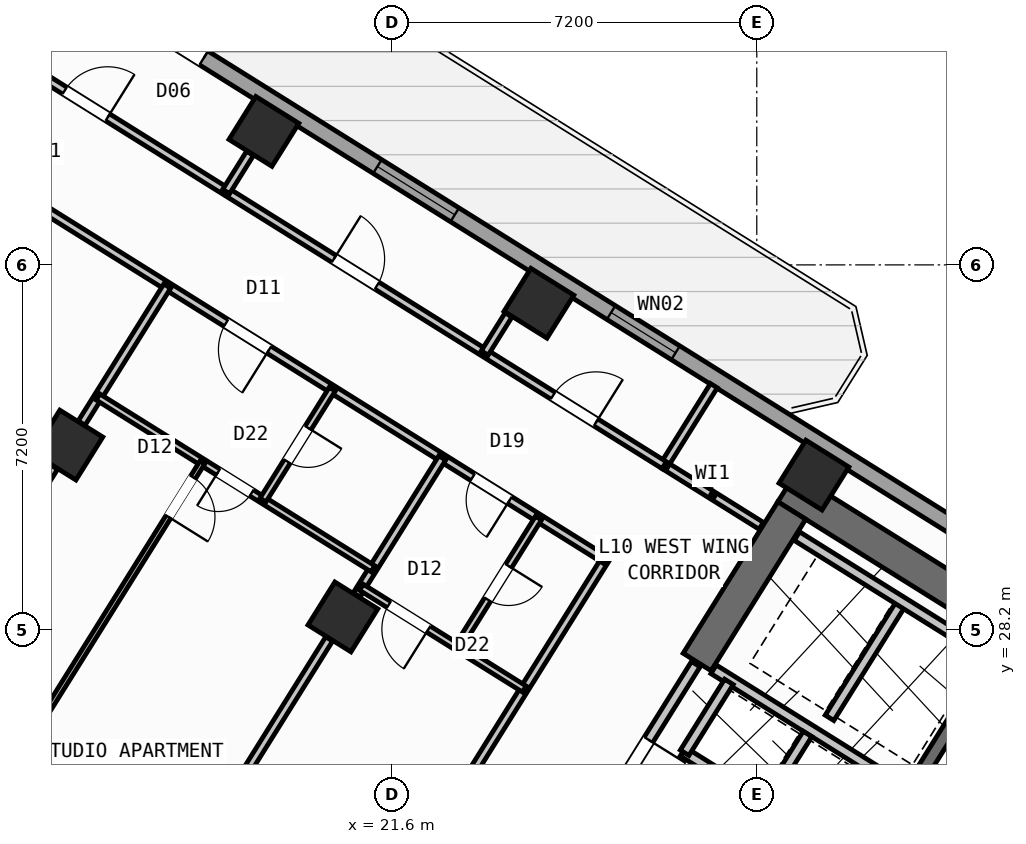
"""IFC4 building model, lengths in metres.
Left out: names, types, materials, properties, quantities, classifications, styles, units other than length and angle.
Written with IfcOpenShell. Run it as: python <this file> out.ifc"""

import sys

from ifc_helpers import new_model, si_unit, direction, frame, frame_2d, origin, origin_2d, place, context, subcontext, project, spatial, rectangle, hollow_rectangle, extrude, source, transform, mapped, element, fill, save


model = new_model("IFC4")
c1 = context("Model", 3, precision=1e-05, world=origin(), true_north=direction((0.0, 1.0)))
c2 = subcontext(c1, "Body", "Model", "MODEL_VIEW")
j1 = project(units=[si_unit("LENGTHUNIT", "METRE"), si_unit("PLANEANGLEUNIT", "RADIAN")], contexts=[c1])
p1 = place(None, origin())
s1 = spatial("IfcSite", under=j1, at=p1, CompositionType="ELEMENT")
p2 = place(p1, origin())
s2 = spatial("IfcBuilding", under=s1, at=p2, CompositionType="ELEMENT")
p3 = place(p2, frame((0.0, 0.0, 42.0)))
s3 = spatial("IfcBuildingStorey", under=s2, at=p3, CompositionType="ELEMENT", Elevation=42.0)
p4 = place(p3, frame((40.615, 23.983, 0.0), z_axis=(0.0, 0.0, 1.0), x_axis=(-0.848045953968, 0.529922692436, 0.0)))
e1 = element("IfcWall", 1, at=p4, inside=s3, PredefinedType="SHEAR", context=c2, shape_type="SweptSolid", body=[
    extrude(rectangle(XDim=13.24, YDim=0.65, at=frame_2d((6.62, 0.0))), origin(), (0.0, 0.0, 1.0), 3.35),
])
p5 = place(p3, frame((29.491, 30.552, 0.0), z_axis=(0.0, 0.0, 1.0), x_axis=(-0.529893103397, -0.8480644427, 0.0)))
e2 = element("IfcWall", 2, at=p5, inside=s3, PredefinedType="SHEAR", context=c2, shape_type="SweptSolid", body=[
    extrude(rectangle(XDim=3.525, YDim=0.65, at=frame_2d((1.763, 0.0))), origin(), (0.0, 0.0, 1.0), 3.35),
])
m1 = source(origin(), c2, "Body", "SweptSolid", [
    extrude(hollow_rectangle(XDim=1.0, YDim=1.0, WallThickness=0.04, at=origin_2d()), origin(), (0.0, 0.0, 1.0), 3.6),
])
for number, where, z_axis, x_axis in (
    (3, (29.928, 31.251, 0.0), (0.0, 0.0, 1.0), (-0.848, 0.53, 0.0)),
    (4, (24.5, 34.643, 0.0), (0.0, 0.0, 1.0), (-0.848, 0.53, 0.0)),
    (5, (20.632, 28.452, 0.0), (0.0, 0.0, 1.0), (-0.848, 0.53, 0.0)),
    (6, (19.073, 38.034, 0.0), (0.0, 0.0, 1.0), (-0.848, 0.53, 0.0)),
    (7, (15.205, 31.844, 0.0), (0.0, 0.0, 1.0), (-0.848, 0.53, 0.0)),
):
    element("IfcColumn", number, at=place(p3, frame(where, z_axis=z_axis, x_axis=x_axis)), inside=s3, PredefinedType="COLUMN", context=c2, shape_type="MappedRepresentation", body=[
        mapped(m1, transform((0.0, 0.0, 0.0), scale=1.0)),
    ])
p6 = place(p3, frame((14.138, 41.825, 0.0), z_axis=(0.0, 0.0, 1.0), x_axis=(0.848046498049, -0.529921821731, 0.0)))
e8 = element("IfcWall", 8, at=p6, inside=s3, PredefinedType="STANDARD", context=c2, shape_type="SweptSolid", body=[
    extrude(rectangle(XDim=31.588, YDim=0.32, at=frame_2d((15.794, 0.0))), origin(), (0.0, 0.0, 1.0), 3.35),
])
p7 = place(p6, frame((3.369, 0.0, 0.0)))
e9 = element("IfcOpeningElement", 9, at=p7, cuts=e8, PredefinedType="OPENING", context=c2, shape_type="SweptSolid", body=[
    extrude(rectangle(XDim=1.05, YDim=2.15, at=frame_2d((0.525, 1.075))), frame((0.0, 0.17, 0.0), z_axis=(0.0, -1.0, 0.0), x_axis=(1.0, 0.0, 0.0)), (0.0, 0.0, 1.0), 0.34),
])
p8 = place(p6, frame((0.946, 0.0, 0.85)))
e10 = element("IfcOpeningElement", 10, at=p8, cuts=e8, PredefinedType="OPENING", context=c2, shape_type="SweptSolid", body=[
    extrude(rectangle(XDim=1.8, YDim=1.5, at=frame_2d((0.9, 0.75))), frame((0.0, 0.17, 0.0), z_axis=(0.0, -1.0, 0.0), x_axis=(1.0, 0.0, 0.0)), (0.0, 0.0, 1.0), 0.34),
])
p9 = place(p6, frame((8.46, 0.0, 0.85)))
e11 = element("IfcOpeningElement", 11, at=p9, cuts=e8, PredefinedType="OPENING", context=c2, shape_type="SweptSolid", body=[
    extrude(rectangle(XDim=1.8, YDim=1.5, at=frame_2d((0.9, 0.75))), frame((0.0, 0.17, 0.0), z_axis=(0.0, -1.0, 0.0), x_axis=(1.0, 0.0, 0.0)), (0.0, 0.0, 1.0), 0.34),
])
p10 = place(p6, frame((13.899, 0.0, 0.85)))
e12 = element("IfcOpeningElement", 12, at=p10, cuts=e8, PredefinedType="OPENING", context=c2, shape_type="SweptSolid", body=[
    extrude(rectangle(XDim=1.5, YDim=1.5, at=frame_2d((0.75, 0.75))), frame((0.0, 0.17, 0.0), z_axis=(0.0, -1.0, 0.0), x_axis=(1.0, 0.0, 0.0)), (0.0, 0.0, 1.0), 0.34),
])
p11 = place(p6, frame((22.019, 0.0, 0.95)))
e13 = element("IfcOpeningElement", 13, at=p11, cuts=e8, PredefinedType="OPENING", context=c2, shape_type="SweptSolid", body=[
    extrude(rectangle(XDim=1.2, YDim=1.4, at=frame_2d((0.6, 0.7))), frame((0.0, 0.17, 0.0), z_axis=(0.0, -1.0, 0.0), x_axis=(1.0, 0.0, 0.0)), (0.0, 0.0, 1.0), 0.34),
])
p12 = place(p6, frame((27.569, 0.0, 0.95)))
e14 = element("IfcOpeningElement", 14, at=p12, cuts=e8, PredefinedType="OPENING", context=c2, shape_type="SweptSolid", body=[
    extrude(rectangle(XDim=1.2, YDim=1.4, at=frame_2d((0.6, 0.7))), frame((0.0, 0.17, 0.0), z_axis=(0.0, -1.0, 0.0), x_axis=(1.0, 0.0, 0.0)), (0.0, 0.0, 1.0), 0.34),
])
p13 = place(p3, frame((33.496, 27.677, 0.0), z_axis=(0.0, 0.0, 1.0), x_axis=(-0.529908658664, -0.84805472316, 0.0)))
e15 = element("IfcWall", 15, at=p13, inside=s3, PredefinedType="SHEAR", context=c2, shape_type="SweptSolid", body=[
    extrude(rectangle(XDim=3.16, YDim=0.26, at=frame_2d((1.58, 0.0))), origin(), (0.0, 0.0, 1.0), 3.35),
])
p14 = place(p3, frame((31.822, 24.998, 0.0), z_axis=(0.0, 0.0, 1.0), x_axis=(-0.848058348634, 0.529902856485, 0.0)))
e16 = element("IfcWall", 16, at=p14, inside=s3, PredefinedType="STANDARD", context=c2, shape_type="SweptSolid", body=[
    extrude(rectangle(XDim=4.568, YDim=0.2, at=frame_2d((2.284, 0.0))), origin(), (0.0, 0.0, 1.0), 3.34),
])
p15 = place(p3, frame((32.108, 22.814, 0.0), z_axis=(0.0, 0.0, 1.0), x_axis=(-0.848042229521, 0.529928652696, 0.0)))
e17 = element("IfcWall", 17, at=p15, inside=s3, PredefinedType="STANDARD", context=c2, shape_type="SweptSolid", body=[
    extrude(rectangle(XDim=5.62, YDim=0.2, at=frame_2d((2.81, 0.0))), origin(), (0.0, 0.0, 1.0), 3.34),
])
p16 = place(p3, frame((28.25, 27.17, 0.0), z_axis=(0.0, 0.0, 1.0), x_axis=(-0.529905827651, -0.848056492117, 0.0)))
e18 = element("IfcWall", 18, at=p16, inside=s3, PredefinedType="STANDARD", context=c2, shape_type="SweptSolid", body=[
    extrude(rectangle(XDim=1.65, YDim=0.2, at=frame_2d((0.825, 0.0))), origin(), (0.0, 0.0, 1.0), 3.34),
])
p17 = place(p3, frame((31.645, 28.716, 0.0), z_axis=(0.0, 0.0, 1.0), x_axis=(-0.52986693015, -0.848080795876, 0.0)))
e19 = element("IfcWall", 19, at=p17, inside=s3, PredefinedType="STANDARD", context=c2, shape_type="SweptSolid", body=[
    extrude(rectangle(XDim=2.66, YDim=0.2, at=frame_2d((1.33, 0.0))), origin(), (0.0, 0.0, 1.0), 3.34),
])
p18 = place(p3, frame((33.363, 27.69, 0.0), z_axis=(0.0, 0.0, 1.0), x_axis=(-0.848053806312, 0.529910125964, 0.0)))
e20 = element("IfcWall", 20, at=p18, inside=s3, PredefinedType="STANDARD", context=c2, shape_type="SweptSolid", body=[
    extrude(rectangle(XDim=4.448, YDim=0.2, at=frame_2d((2.224, 0.0))), origin(), (0.0, 0.0, 1.0), 3.34),
])
p19 = place(p3, frame((29.801, 26.142, 0.0), z_axis=(0.0, 0.0, 1.0), x_axis=(-0.529998940003, -0.847998304005, 0.0)))
e21 = element("IfcWall", 21, at=p19, inside=s3, PredefinedType="STANDARD", context=c2, shape_type="SweptSolid", body=[
    extrude(rectangle(XDim=1.58, YDim=0.2, at=frame_2d((0.79, 0.0))), origin(), (0.0, 0.0, 1.0), 3.34),
])
p20 = place(p3, frame((27.596, 27.52, 0.0), z_axis=(0.0, 0.0, 1.0), x_axis=(-0.529865479138, -0.848081702443, 0.0)))
e22 = element("IfcWall", 22, at=p20, inside=s3, PredefinedType="STANDARD", context=c2, shape_type="SweptSolid", body=[
    extrude(rectangle(XDim=2.96, YDim=0.2, at=frame_2d((1.48, 0.0))), origin(), (0.0, 0.0, 1.0), 3.34),
])
p21 = place(p20, frame((1.76, 0.0, 0.0)))
e23 = element("IfcOpeningElement", 23, at=p21, cuts=e22, PredefinedType="OPENING", context=c2, shape_type="SweptSolid", body=[
    extrude(rectangle(XDim=0.86, YDim=2.05, at=frame_2d((0.43, 1.025))), frame((0.0, 0.11, 0.0), z_axis=(0.0, -1.0, 0.0), x_axis=(1.0, 0.0, 0.0)), (0.0, 0.0, 1.0), 0.22),
])
p22 = place(p3, frame((28.887, 30.251, 0.0), z_axis=(0.0, 0.0, 1.0), x_axis=(-0.848040823168, 0.52993090327, 0.0)))
e24 = element("IfcWall", 24, at=p22, inside=s3, PredefinedType="PARTITIONING", context=c2, shape_type="SweptSolid", body=[
    extrude(rectangle(XDim=2.258, YDim=0.16, at=frame_2d((1.129, 0.0))), origin(), (0.0, 0.0, 1.0), 3.34),
])
p23 = place(p3, frame((27.953, 33.016, 0.0), z_axis=(0.0, 0.0, 1.0), x_axis=(-0.529880305451, -0.848072439061, 0.0)))
e25 = element("IfcWall", 25, at=p23, inside=s3, PredefinedType="PARTITIONING", context=c2, shape_type="SweptSolid", body=[
    extrude(rectangle(XDim=1.85, YDim=0.16, at=frame_2d((0.925, 0.0))), origin(), (0.0, 0.0, 1.0), 3.34),
])
p24 = place(p3, frame((25.807, 29.582, 0.0), z_axis=(0.0, 0.0, 1.0), x_axis=(-0.529918119251, -0.84804881162, 0.0)))
e26 = element("IfcWall", 26, at=p24, inside=s3, PredefinedType="PARTITIONING", context=c2, shape_type="SweptSolid", body=[
    extrude(rectangle(XDim=17.65, YDim=0.16, at=frame_2d((8.825, 0.0))), origin(), (0.0, 0.0, 1.0), 3.34),
])
p25 = place(p3, frame((26.973, 31.447, 0.0), z_axis=(0.0, 0.0, 1.0), x_axis=(-0.848048310262, 0.529918921593, 0.0)))
e27 = element("IfcWall", 27, at=p25, inside=s3, PredefinedType="PARTITIONING", context=c2, shape_type="SweptSolid", body=[
    extrude(rectangle(XDim=16.73, YDim=0.16, at=frame_2d((8.365, 0.0))), origin(), (0.0, 0.0, 1.0), 3.34),
])
p26 = place(p25, frame((1.588, 0.0, 0.0)))
e28 = element("IfcOpeningElement", 28, at=p26, cuts=e27, PredefinedType="OPENING", context=c2, shape_type="SweptSolid", body=[
    extrude(rectangle(XDim=1.0, YDim=2.1, at=frame_2d((0.5, 1.05))), frame((0.0, 0.09, 0.0), z_axis=(0.0, -1.0, 0.0), x_axis=(1.0, 0.0, 0.0)), (0.0, 0.0, 1.0), 0.18),
])
p27 = place(p25, frame((6.685, 0.0, 0.0)))
e29 = element("IfcOpeningElement", 29, at=p27, cuts=e27, PredefinedType="OPENING", context=c2, shape_type="SweptSolid", body=[
    extrude(rectangle(XDim=1.0, YDim=2.1, at=frame_2d((0.5, 1.05))), frame((0.0, 0.09, 0.0), z_axis=(0.0, -1.0, 0.0), x_axis=(1.0, 0.0, 0.0)), (0.0, 0.0, 1.0), 0.18),
])
p28 = place(p25, frame((12.951, 0.0, 0.0)))
e30 = element("IfcOpeningElement", 30, at=p28, cuts=e27, PredefinedType="OPENING", context=c2, shape_type="SweptSolid", body=[
    extrude(rectangle(XDim=1.0, YDim=2.1, at=frame_2d((0.5, 1.05))), frame((0.0, 0.09, 0.0), z_axis=(0.0, -1.0, 0.0), x_axis=(1.0, 0.0, 0.0)), (0.0, 0.0, 1.0), 0.18),
])
p29 = place(p3, frame((25.807, 29.582, 0.0), z_axis=(0.0, 0.0, 1.0), x_axis=(-0.848052408131, 0.529912363569, 0.0)))
e31 = element("IfcWall", 31, at=p29, inside=s3, PredefinedType="PARTITIONING", context=c2, shape_type="SweptSolid", body=[
    extrude(rectangle(XDim=16.73, YDim=0.16, at=frame_2d((8.365, 0.0))), origin(), (0.0, 0.0, 1.0), 3.34),
])
p30 = place(p29, frame((2.22, 0.0, 0.0)))
e32 = element("IfcOpeningElement", 32, at=p30, cuts=e31, PredefinedType="OPENING", context=c2, shape_type="SweptSolid", body=[
    extrude(rectangle(XDim=0.86, YDim=2.05, at=frame_2d((0.43, 1.025))), frame((0.0, 0.09, 0.0), z_axis=(0.0, -1.0, 0.0), x_axis=(1.0, 0.0, 0.0)), (0.0, 0.0, 1.0), 0.18),
])
p31 = place(p29, frame((7.82, 0.0, 0.0)))
e33 = element("IfcOpeningElement", 33, at=p31, cuts=e31, PredefinedType="OPENING", context=c2, shape_type="SweptSolid", body=[
    extrude(rectangle(XDim=1.0, YDim=2.1, at=frame_2d((0.5, 1.05))), frame((0.0, 0.09, 0.0), z_axis=(0.0, -1.0, 0.0), x_axis=(1.0, 0.0, 0.0)), (0.0, 0.0, 1.0), 0.18),
])
p32 = place(p29, frame((12.95, 0.0, 0.0)))
e34 = element("IfcOpeningElement", 34, at=p32, cuts=e31, PredefinedType="OPENING", context=c2, shape_type="SweptSolid", body=[
    extrude(rectangle(XDim=1.0, YDim=2.1, at=frame_2d((0.5, 1.05))), frame((0.0, 0.09, 0.0), z_axis=(0.0, -1.0, 0.0), x_axis=(1.0, 0.0, 0.0)), (0.0, 0.0, 1.0), 0.18),
])
p33 = place(p3, frame((22.593, 31.59, 0.0), z_axis=(0.0, 0.0, 1.0), x_axis=(-0.529930102756, -0.848041323399, 0.0)))
e35 = element("IfcWall", 35, at=p33, inside=s3, PredefinedType="PARTITIONING", context=c2, shape_type="SweptSolid", body=[
    extrude(rectangle(XDim=3.188, YDim=0.16, at=frame_2d((1.594, 0.0))), origin(), (0.0, 0.0, 1.0), 2.725),
])
p34 = place(p3, frame((20.361, 28.018, 0.0), z_axis=(0.0, 0.0, 1.0), x_axis=(-0.529915015264, -0.848050751193, 0.0)))
e36 = element("IfcWall", 36, at=p34, inside=s3, PredefinedType="PARTITIONING", context=c2, shape_type="SweptSolid", body=[
    extrude(rectangle(XDim=6.276, YDim=0.16, at=frame_2d((3.138, 0.0))), origin(), (0.0, 0.0, 1.0), 2.725),
])
p35 = place(p3, frame((24.212, 27.029, 0.0), z_axis=(0.0, 0.0, 1.0), x_axis=(-0.84803087207, 0.529946827537, 0.0)))
e37 = element("IfcWall", 37, at=p35, inside=s3, PredefinedType="PLUMBINGWALL", context=c2, shape_type="SweptSolid", body=[
    extrude(rectangle(XDim=3.79, YDim=0.14, at=frame_2d((1.895, 0.0))), origin(), (0.0, 0.0, 1.0), 3.34),
])
p36 = place(p35, frame((2.23, 0.0, 0.0)))
e38 = element("IfcOpeningElement", 38, at=p36, cuts=e37, PredefinedType="OPENING", context=c2, shape_type="SweptSolid", body=[
    extrude(rectangle(XDim=0.92, YDim=2.08, at=frame_2d((0.46, 1.04))), frame((0.0, 0.08, 0.0), z_axis=(0.0, -1.0, 0.0), x_axis=(1.0, 0.0, 0.0)), (0.0, 0.0, 1.0), 0.16),
])
p37 = place(p3, frame((24.492, 30.403, 0.0), z_axis=(0.0, 0.0, 1.0), x_axis=(-0.529977067289, -0.848011974059, 0.0)))
e39 = element("IfcWall", 39, at=p37, inside=s3, PredefinedType="PLUMBINGWALL", context=c2, shape_type="SweptSolid", body=[
    extrude(rectangle(XDim=3.01, YDim=0.14, at=frame_2d((1.505, 0.0))), origin(), (0.0, 0.0, 1.0), 2.995),
])
p38 = place(p37, frame((1.115, 0.0, 0.0)))
e40 = element("IfcOpeningElement", 40, at=p38, cuts=e39, PredefinedType="OPENING", context=c2, shape_type="SweptSolid", body=[
    extrude(rectangle(XDim=0.78, YDim=2.05, at=frame_2d((0.39, 1.025))), frame((0.0, 0.08, 0.0), z_axis=(0.0, -1.0, 0.0), x_axis=(1.0, 0.0, 0.0)), (0.0, 0.0, 1.0), 0.16),
])
p39 = place(p3, frame((17.165, 34.981, 0.0), z_axis=(0.0, 0.0, 1.0), x_axis=(-0.529930102756, -0.848041323399, 0.0)))
e41 = element("IfcWall", 41, at=p39, inside=s3, PredefinedType="PARTITIONING", context=c2, shape_type="SweptSolid", body=[
    extrude(rectangle(XDim=3.188, YDim=0.16, at=frame_2d((1.594, 0.0))), origin(), (0.0, 0.0, 1.0), 2.725),
])
p40 = place(p3, frame((14.933, 31.409, 0.0), z_axis=(0.0, 0.0, 1.0), x_axis=(-0.529897533635, -0.848061674554, 0.0)))
e42 = element("IfcWall", 42, at=p40, inside=s3, PredefinedType="PARTITIONING", context=c2, shape_type="SweptSolid", body=[
    extrude(rectangle(XDim=6.276, YDim=0.16, at=frame_2d((3.138, 0.0))), origin(), (0.0, 0.0, 1.0), 2.725),
])
p41 = place(p3, frame((21.226, 29.402, 0.0), z_axis=(0.0, 0.0, 1.0), x_axis=(-0.848039019877, 0.529933789039, 0.0)))
e43 = element("IfcWall", 43, at=p41, inside=s3, PredefinedType="PLUMBINGWALL", context=c2, shape_type="SweptSolid", body=[
    extrude(rectangle(XDim=6.4, YDim=0.14, at=frame_2d((3.2, 0.0))), origin(), (0.0, 0.0, 1.0), 3.34),
])
p42 = place(p41, frame((2.824, 0.0, 0.0)))
e44 = element("IfcOpeningElement", 44, at=p42, cuts=e43, PredefinedType="OPENING", context=c2, shape_type="SweptSolid", body=[
    extrude(rectangle(XDim=0.78, YDim=2.05, at=frame_2d((0.39, 1.025))), frame((0.0, 0.08, 0.0), z_axis=(0.0, -1.0, 0.0), x_axis=(1.0, 0.0, 0.0)), (0.0, 0.0, 1.0), 0.16),
])
p43 = place(p3, frame((20.422, 32.947, 0.0), z_axis=(0.0, 0.0, 1.0), x_axis=(-0.529913878929, -0.848051461244, 0.0)))
e45 = element("IfcWall", 45, at=p43, inside=s3, PredefinedType="PLUMBINGWALL", context=c2, shape_type="SweptSolid", body=[
    extrude(rectangle(XDim=2.58, YDim=0.14, at=frame_2d((1.29, 0.0))), origin(), (0.0, 0.0, 1.0), 3.34),
])
p44 = place(p43, frame((0.9, 0.0, 0.0)))
e46 = element("IfcOpeningElement", 46, at=p44, cuts=e45, PredefinedType="OPENING", context=c2, shape_type="SweptSolid", body=[
    extrude(rectangle(XDim=0.78, YDim=2.05, at=frame_2d((0.39, 1.025))), frame((0.0, 0.08, 0.0), z_axis=(0.0, -1.0, 0.0), x_axis=(1.0, 0.0, 0.0)), (0.0, 0.0, 1.0), 0.16),
])
p45 = place(p3, frame((17.861, 31.505, 0.0), z_axis=(0.0, 0.0, 1.0), x_axis=(-0.529928839727, -0.848042112649, 0.0)))
e47 = element("IfcWall", 47, at=p45, inside=s3, PredefinedType="PARTITIONING", context=c2, shape_type="SweptSolid", body=[
    extrude(rectangle(XDim=15.34, YDim=0.11, at=frame_2d((7.67, 0.0))), origin(), (0.0, 0.0, 1.0), 3.34),
])
p46 = place(p45, frame((0.35, 0.0, 0.0)))
e48 = element("IfcOpeningElement", 48, at=p46, cuts=e47, PredefinedType="OPENING", context=c2, shape_type="SweptSolid", body=[
    extrude(rectangle(XDim=0.92, YDim=2.08, at=frame_2d((0.46, 1.04))), frame((0.0, 0.065, 0.0), z_axis=(0.0, -1.0, 0.0), x_axis=(1.0, 0.0, 0.0)), (0.0, 0.0, 1.0), 0.13),
])
p47 = place(p3, frame((23.901, 34.414, 0.0), z_axis=(0.0, 0.0, 1.0), x_axis=(-0.529776512202, -0.848137280821, 0.0)))
e49 = element("IfcWall", 49, at=p47, inside=s3, PredefinedType="PARTITIONING", context=c2, shape_type="SweptSolid", body=[
    extrude(rectangle(XDim=0.888, YDim=0.16, at=frame_2d((0.444, 0.0))), origin(), (0.0, 0.0, 1.0), 3.34),
])
p48 = place(p3, frame((18.799, 37.602, 0.0), z_axis=(0.0, 0.0, 1.0), x_axis=(-0.529974231203, -0.848013746505, 0.0)))
e50 = element("IfcWall", 50, at=p48, inside=s3, PredefinedType="PARTITIONING", context=c2, shape_type="SweptSolid", body=[
    extrude(rectangle(XDim=0.888, YDim=0.16, at=frame_2d((0.444, 0.0))), origin(), (0.0, 0.0, 1.0), 2.725),
])
m2 = source(origin(), c2, "Body", "SweptSolid", [
    extrude(rectangle(XDim=1.05, YDim=2.15, at=frame_2d((0.525, 1.075))), frame((0.0, 0.025, 0.0), z_axis=(0.0, -1.0, 0.0), x_axis=(1.0, 0.0, 0.0)), (0.0, 0.0, 1.0), 0.05),
])
p49 = place(p7, origin())
e51 = element("IfcDoor", 51, at=p49, inside=s3, OperationType="SINGLE_SWING_RIGHT", PredefinedType="DOOR", context=c2, shape_type="MappedRepresentation", body=[
    mapped(m2, transform((0.0, 0.0, 0.0), scale=1.0)),
])
fill(e9, e51)
m3 = source(origin(), c2, "Body", "SweptSolid", [
    extrude(rectangle(XDim=1.8, YDim=1.5, at=frame_2d((0.9, 0.75))), frame((0.0, 0.03, 0.0), z_axis=(0.0, -1.0, 0.0), x_axis=(1.0, 0.0, 0.0)), (0.0, 0.0, 1.0), 0.06),
])
p50 = place(p9, origin())
e52 = element("IfcWindow", 52, at=p50, inside=s3, PartitioningType="SINGLE_PANEL", PredefinedType="WINDOW", context=c2, shape_type="MappedRepresentation", body=[
    mapped(m3, transform((0.0, 0.0, 0.0), scale=1.0)),
])
fill(e11, e52)
m4 = source(origin(), c2, "Body", "SweptSolid", [
    extrude(rectangle(XDim=1.5, YDim=1.5, at=frame_2d((0.75, 0.75))), frame((0.0, 0.03, 0.0), z_axis=(0.0, -1.0, 0.0), x_axis=(1.0, 0.0, 0.0)), (0.0, 0.0, 1.0), 0.06),
])
p51 = place(p10, origin())
e53 = element("IfcWindow", 53, at=p51, inside=s3, PartitioningType="SINGLE_PANEL", PredefinedType="WINDOW", context=c2, shape_type="MappedRepresentation", body=[
    mapped(m4, transform((0.0, 0.0, 0.0), scale=1.0)),
])
fill(e12, e53)
m5 = source(origin(), c2, "Body", "SweptSolid", [
    extrude(rectangle(XDim=0.86, YDim=2.05, at=frame_2d((0.43, 1.025))), frame((0.0, 0.025, 0.0), z_axis=(0.0, -1.0, 0.0), x_axis=(1.0, 0.0, 0.0)), (0.0, 0.0, 1.0), 0.05),
])
p52 = place(p21, origin())
e54 = element("IfcDoor", 54, at=p52, inside=s3, OperationType="SINGLE_SWING_LEFT", PredefinedType="DOOR", context=c2, shape_type="MappedRepresentation", body=[
    mapped(m5, transform((0.0, 0.0, 0.0), scale=1.0)),
])
fill(e23, e54)
p53 = place(p30, origin())
e55 = element("IfcDoor", 55, at=p53, inside=s3, OperationType="SINGLE_SWING_LEFT", PredefinedType="DOOR", context=c2, shape_type="MappedRepresentation", body=[
    mapped(m5, transform((0.0, 0.0, 0.0), scale=1.0)),
])
fill(e32, e55)
m6 = source(origin(), c2, "Body", "SweptSolid", [
    extrude(rectangle(XDim=0.92, YDim=2.08, at=frame_2d((0.46, 1.04))), frame((0.0, 0.025, 0.0), z_axis=(0.0, -1.0, 0.0), x_axis=(1.0, 0.0, 0.0)), (0.0, 0.0, 1.0), 0.05),
])
p54 = place(p36, origin())
e56 = element("IfcDoor", 56, at=p54, inside=s3, OperationType="SINGLE_SWING_LEFT", PredefinedType="DOOR", context=c2, shape_type="MappedRepresentation", body=[
    mapped(m6, transform((0.0, 0.0, 0.0), scale=1.0)),
])
fill(e38, e56)
m7 = source(origin(), c2, "Body", "SweptSolid", [
    extrude(rectangle(XDim=0.78, YDim=2.05, at=frame_2d((0.39, 1.025))), frame((0.0, 0.025, 0.0), z_axis=(0.0, -1.0, 0.0), x_axis=(1.0, 0.0, 0.0)), (0.0, 0.0, 1.0), 0.05),
])
p55 = place(p38, origin())
e57 = element("IfcDoor", 57, at=p55, inside=s3, OperationType="SINGLE_SWING_LEFT", PredefinedType="DOOR", context=c2, shape_type="MappedRepresentation", body=[
    mapped(m7, transform((0.0, 0.0, 0.0), scale=1.0)),
])
fill(e40, e57)
p56 = place(p46, origin())
e58 = element("IfcDoor", 58, at=p56, inside=s3, OperationType="SINGLE_SWING_RIGHT", PredefinedType="DOOR", context=c2, shape_type="MappedRepresentation", body=[
    mapped(m6, transform((0.0, 0.0, 0.0), scale=1.0)),
])
fill(e48, e58)
m8 = source(origin(), c2, "Body", "SweptSolid", [
    extrude(rectangle(XDim=1.0, YDim=2.1, at=frame_2d((0.5, 1.05))), frame((0.0, 0.025, 0.0), z_axis=(0.0, -1.0, 0.0), x_axis=(1.0, 0.0, 0.0)), (0.0, 0.0, 1.0), 0.05),
])
p57 = place(p31, origin())
e59 = element("IfcDoor", 59, at=p57, inside=s3, OperationType="SINGLE_SWING_LEFT", PredefinedType="DOOR", context=c2, shape_type="MappedRepresentation", body=[
    mapped(m8, transform((0.0, 0.0, 0.0), scale=1.0)),
])
fill(e33, e59)
p58 = place(p42, origin())
e60 = element("IfcDoor", 60, at=p58, inside=s3, OperationType="SINGLE_SWING_RIGHT", PredefinedType="DOOR", context=c2, shape_type="MappedRepresentation", body=[
    mapped(m7, transform((0.0, 0.0, 0.0), scale=1.0)),
])
fill(e44, e60)
p59 = place(p44, origin())
e61 = element("IfcDoor", 61, at=p59, inside=s3, OperationType="SINGLE_SWING_LEFT", PredefinedType="DOOR", context=c2, shape_type="MappedRepresentation", body=[
    mapped(m7, transform((0.0, 0.0, 0.0), scale=1.0)),
])
fill(e46, e61)
p60 = place(p26, frame((1.0, 0.0, 0.0), z_axis=(0.0, 0.0, 1.0), x_axis=(-1.0, 0.0, 0.0)))
e62 = element("IfcDoor", 62, at=p60, inside=s3, OperationType="SINGLE_SWING_RIGHT", PredefinedType="DOOR", context=c2, shape_type="MappedRepresentation", body=[
    mapped(m8, transform((0.0, 0.0, 0.0), scale=1.0)),
])
fill(e28, e62)
p61 = place(p27, frame((1.0, 0.0, 0.0), z_axis=(0.0, 0.0, 1.0), x_axis=(-1.0, 0.0, 0.0)))
e63 = element("IfcDoor", 63, at=p61, inside=s3, OperationType="SINGLE_SWING_LEFT", PredefinedType="DOOR", context=c2, shape_type="MappedRepresentation", body=[
    mapped(m8, transform((0.0, 0.0, 0.0), scale=1.0)),
])
fill(e29, e63)
p62 = place(p28, frame((1.0, 0.0, 0.0), z_axis=(0.0, 0.0, 1.0), x_axis=(-1.0, 0.0, 0.0)))
e64 = element("IfcDoor", 64, at=p62, inside=s3, OperationType="SINGLE_SWING_RIGHT", PredefinedType="DOOR", context=c2, shape_type="MappedRepresentation", body=[
    mapped(m8, transform((0.0, 0.0, 0.0), scale=1.0)),
])
fill(e30, e64)
save(model, sys.argv[1])
